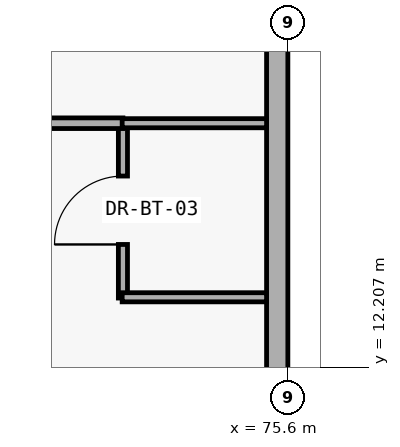
"""IFC4 building model, lengths in metres.
Left out: names, types, materials, properties, quantities, classifications, styles, units other than length and angle.
Written with IfcOpenShell. Run it as: python <this file> out.ifc"""

import sys

from ifc_helpers import new_model, si_unit, direction, frame, frame_2d, origin, place, context, subcontext, project, spatial, rectangle, extrude, element, fill, save


model = new_model("IFC4")
c1 = context("Model", 3, precision=1e-05, world=origin(), true_north=direction((0.0, 1.0)))
c2 = subcontext(c1, "Body", "Model", "MODEL_VIEW")
j1 = project(units=[si_unit("LENGTHUNIT", "METRE"), si_unit("PLANEANGLEUNIT", "RADIAN")], contexts=[c1])
p1 = place(None, origin())
s1 = spatial("IfcSite", under=j1, at=p1, CompositionType="ELEMENT")
p2 = place(p1, origin())
s2 = spatial("IfcBuilding", under=s1, at=p2, CompositionType="ELEMENT")
p3 = place(p2, frame((0.0, 0.0, 37.2)))
s3 = spatial("IfcBuildingStorey", under=s2, at=p3, CompositionType="ELEMENT", Elevation=37.2)
p4 = place(p3, frame((75.46, 34.0, 0.0), z_axis=(0.0, 0.0, 1.0), x_axis=(0.0, -1.0, 0.0)))
e1 = element("IfcWall", 1, at=p4, inside=s3, PredefinedType="SOLIDWALL", context=c2, shape_type="SweptSolid", body=[
    extrude(rectangle(XDim=25.2, YDim=0.28, at=frame_2d((12.6, 0.0))), origin(), (0.0, 0.0, 1.0), 3.34),
])
p5 = place(p4, frame((21.9, 0.0, 0.95)))
e2 = element("IfcOpeningElement", 2, at=p5, cuts=e1, PredefinedType="OPENING", context=c2, shape_type="SweptSolid", body=[
    extrude(rectangle(XDim=1.6, YDim=1.6, at=frame_2d((0.8, 0.8))), frame((0.0, 0.15, 0.0), z_axis=(0.0, -1.0, 0.0), x_axis=(1.0, 0.0, 0.0)), (0.0, 0.0, 1.0), 0.3),
])
p6 = place(p3, frame((73.43, 13.12, 0.0), z_axis=(0.0, 0.0, 1.0), x_axis=(0.0, 1.0, 0.0)))
e3 = element("IfcWall", 3, at=p6, inside=s3, PredefinedType="PARTITIONING", context=c2, shape_type="SweptSolid", body=[
    extrude(rectangle(XDim=2.31, YDim=0.12, at=frame_2d((1.155, 0.0))), origin(), (0.0, 0.0, 1.0), 2.48),
])
p7 = place(p6, frame((0.705, 0.0, 0.0)))
e4 = element("IfcOpeningElement", 4, at=p7, cuts=e3, PredefinedType="OPENING", context=c2, shape_type="SweptSolid", body=[
    extrude(rectangle(XDim=0.9, YDim=2.18, at=frame_2d((0.45, 1.09))), frame((0.0, 0.07, 0.0), z_axis=(0.0, -1.0, 0.0), x_axis=(1.0, 0.0, 0.0)), (0.0, 0.0, 1.0), 0.14),
])
p8 = place(p3, frame((70.293, 15.42, 0.0), z_axis=(0.0, 0.0, 1.0), x_axis=(1.0, 0.0, 0.0)))
e5 = element("IfcWall", 5, at=p8, inside=s3, PredefinedType="PARTITIONING", context=c2, shape_type="SweptSolid", body=[
    extrude(rectangle(XDim=3.137, YDim=0.14, at=frame_2d((1.568, 0.0))), origin(), (0.0, 0.0, 1.0), 2.48),
])
p9 = place(p8, frame((0.87, 0.0, 0.0)))
e6 = element("IfcOpeningElement", 6, at=p9, cuts=e5, PredefinedType="OPENING", context=c2, shape_type="SweptSolid", body=[
    extrude(rectangle(XDim=1.0, YDim=2.28, at=frame_2d((0.5, 1.14))), frame((0.0, 0.08, 0.0), z_axis=(0.0, -1.0, 0.0), x_axis=(1.0, 0.0, 0.0)), (0.0, 0.0, 1.0), 0.16),
])
for number, where, z_axis, x_axis in (
    (7, (73.42, 13.13, 0.0), (0.0, 0.0, 1.0), (1.0, 0.0, 0.0)),
    (8, (73.42, 15.42, 0.0), (0.0, 0.0, 1.0), (1.0, 0.0, 0.0)),
):
    element("IfcWall", number, at=place(p3, frame(where, z_axis=z_axis, x_axis=x_axis)), inside=s3, PredefinedType="PARTITIONING", context=c2, shape_type="SweptSolid", body=[
        extrude(rectangle(XDim=1.9, YDim=0.12, at=frame_2d((0.95, 0.0))), origin(), (0.0, 0.0, 1.0), 2.48),
    ])
p10 = place(p7, origin())
e9 = element("IfcDoor", 9, at=p10, inside=s3, OperationType="SINGLE_SWING_LEFT", PredefinedType="DOOR", context=c2, shape_type="SweptSolid", body=[
    extrude(rectangle(XDim=0.9, YDim=2.18, at=frame_2d((0.45, 1.09))), frame((0.0, 0.025, 0.0), z_axis=(0.0, -1.0, 0.0), x_axis=(1.0, 0.0, 0.0)), (0.0, 0.0, 1.0), 0.05),
])
fill(e4, e9)
save(model, sys.argv[1])
